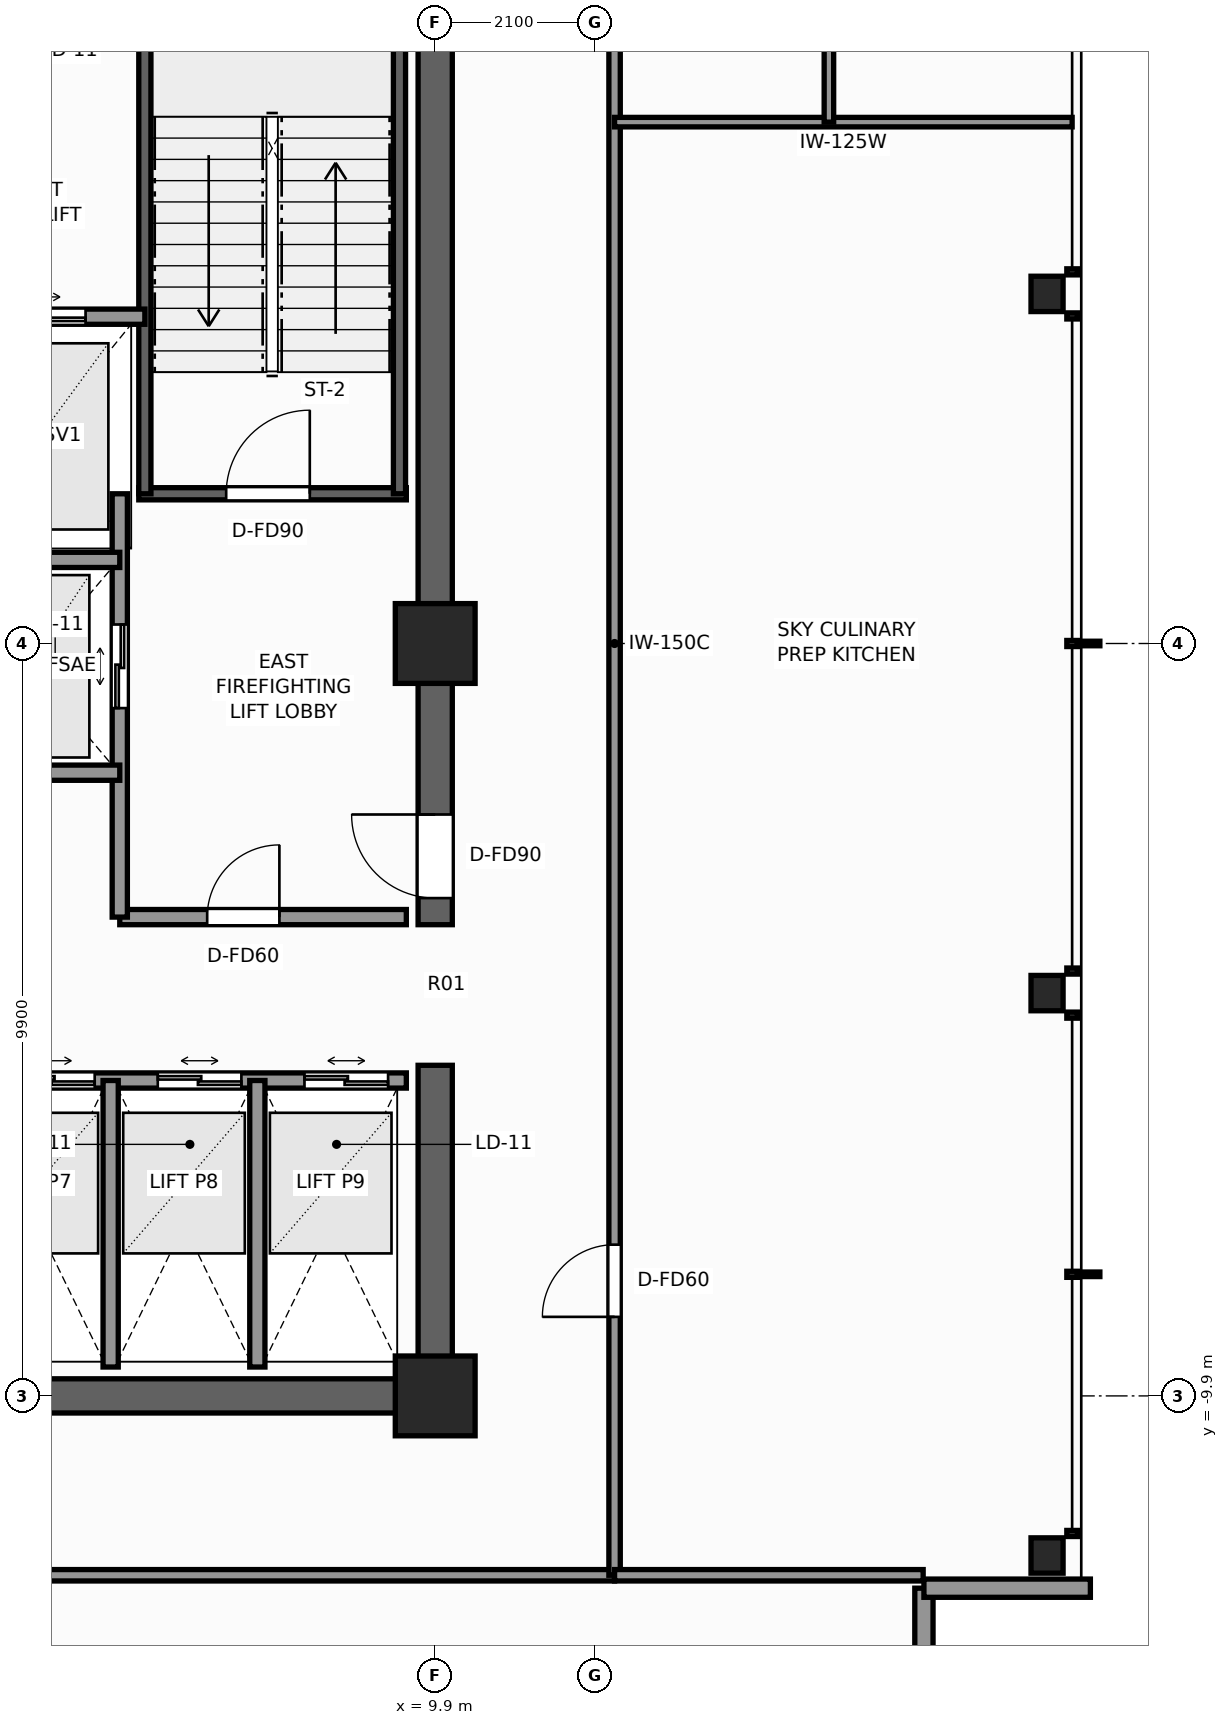
"""IFC4 building model, lengths in metres.
Left out: names, types, materials, properties, quantities, classifications, styles, units other than length and angle.
Written with IfcOpenShell. Run it as: python <this file> out.ifc"""

import sys

from ifc_helpers import new_model, si_unit, direction, frame, frame_2d, origin, origin_2d, place, context, subcontext, project, spatial, rectangle, i_section, extrude, element, fill, save


model = new_model("IFC4")
c1 = context("Model", 3, precision=1e-05, world=origin(), true_north=direction((0.0, 1.0)))
c2 = subcontext(c1, "Body", "Model", "MODEL_VIEW")
j1 = project(units=[si_unit("LENGTHUNIT", "METRE"), si_unit("PLANEANGLEUNIT", "RADIAN")], contexts=[c1])
p1 = place(None, origin())
s1 = spatial("IfcSite", under=j1, at=p1, CompositionType="ELEMENT")
p2 = place(p1, origin())
s2 = spatial("IfcBuilding", under=s1, at=p2, CompositionType="ELEMENT")
p3 = place(p2, frame((0.0, 0.0, 258.4)))
s3 = spatial("IfcBuildingStorey", under=s2, at=p3, CompositionType="ELEMENT", Elevation=258.4)
p4 = place(p3, frame((10.125, -9.9, 0.0), z_axis=(0.0, 0.0, 1.0), x_axis=(-1.0, 0.0, 0.0)))
e1 = element("IfcWall", 1, at=p4, inside=s3, PredefinedType="SHEAR", context=c2, shape_type="SweptSolid", body=[
    extrude(rectangle(XDim=11.985, YDim=0.45, at=frame_2d((5.993, 0.0))), origin(), (0.0, 0.0, 1.0), 4.4),
])
p5 = place(p3, frame((9.9, -9.675, 0.0), z_axis=(0.0, 0.0, 1.0), x_axis=(0.0, 1.0, 0.0)))
e2 = element("IfcWall", 2, at=p5, inside=s3, PredefinedType="SHEAR", context=c2, shape_type="SweptSolid", body=[
    extrude(rectangle(XDim=4.125, YDim=0.45, at=frame_2d((2.062, 0.0))), origin(), (0.0, 0.0, 1.0), 4.4),
])
p6 = place(p3, frame((9.9, -3.7, 0.0), z_axis=(0.0, 0.0, 1.0), x_axis=(0.0, 1.0, 0.0)))
e3 = element("IfcWall", 3, at=p6, inside=s3, PredefinedType="SHEAR", context=c2, shape_type="SweptSolid", body=[
    extrude(rectangle(XDim=13.375, YDim=0.45, at=frame_2d((6.688, 0.0))), origin(), (0.0, 0.0, 1.0), 4.4),
])
p7 = place(p6, frame((0.35, 0.0, 0.0)))
e4 = element("IfcOpeningElement", 4, at=p7, cuts=e3, PredefinedType="OPENING", context=c2, shape_type="SweptSolid", body=[
    extrude(rectangle(XDim=1.1, YDim=2.2, at=frame_2d((0.55, 1.1))), frame((0.0, 0.235, 0.0), z_axis=(0.0, -1.0, 0.0), x_axis=(1.0, 0.0, 0.0)), (0.0, 0.0, 1.0), 0.47),
])
for number, where, z_axis, x_axis in (
    (5, (9.9, -9.9, 0.0), (0.0, 0.0, 1.0), (1.0, 0.0, 0.0)),
    (6, (9.9, 0.0, 0.0), (0.0, 0.0, 1.0), (1.0, 0.0, 0.0)),
):
    element("IfcColumn", number, at=place(p3, frame(where, z_axis=z_axis, x_axis=x_axis)), inside=s3, PredefinedType="COLUMN", context=c2, shape_type="SweptSolid", body=[
        extrude(rectangle(XDim=1.05, YDim=1.05, at=origin_2d()), origin(), (0.0, 0.0, 1.0), 4.4),
    ])
for number, where, z_axis, x_axis in (
    (7, (17.95, -12.0, 0.0), (0.0, 0.0, 1.0), (1.0, 0.0, 0.0)),
    (8, (17.95, -4.6, 0.0), (0.0, 0.0, 1.0), (1.0, 0.0, 0.0)),
    (9, (17.95, 4.6, 0.0), (0.0, 0.0, 1.0), (1.0, 0.0, 0.0)),
):
    element("IfcColumn", number, at=place(p3, frame(where, z_axis=z_axis, x_axis=x_axis)), inside=s3, PredefinedType="COLUMN", context=c2, shape_type="SweptSolid", body=[
        extrude(i_section(OverallWidth=0.422, OverallDepth=0.465, WebThickness=0.045, FlangeThickness=0.073, FilletRadius=0.025, at=origin_2d()), origin(), (0.0, 0.0, 1.0), 4.4),
    ])
p8 = place(p3, frame((16.33, -12.43, 0.0), z_axis=(0.0, 0.0, 1.0), x_axis=(0.0, -1.0, 0.0)))
e10 = element("IfcWall", 10, at=p8, inside=s3, PredefinedType="STANDARD", context=c2, shape_type="SweptSolid", body=[
    extrude(rectangle(XDim=2.19, YDim=0.24, at=frame_2d((1.095, 0.0))), origin(), (0.0, 0.0, 1.0), 3.503),
])
p9 = place(p3, frame((18.52, -12.43, 0.0), z_axis=(0.0, 0.0, 1.0), x_axis=(-1.0, 0.0, 0.0)))
e11 = element("IfcWall", 11, at=p9, inside=s3, PredefinedType="STANDARD", context=c2, shape_type="SweptSolid", body=[
    extrude(rectangle(XDim=2.19, YDim=0.24, at=frame_2d((1.095, 0.0))), origin(), (0.0, 0.0, 1.0), 3.503),
])
p10 = place(p3, frame((6.0, 1.97, 0.0), z_axis=(0.0, 0.0, 1.0), x_axis=(1.0, 0.0, 0.0)))
e12 = element("IfcWall", 12, at=p10, inside=s3, PredefinedType="SHEAR", context=c2, shape_type="SweptSolid", body=[
    extrude(rectangle(XDim=3.52, YDim=0.16, at=frame_2d((1.76, 0.0))), origin(), (0.0, 0.0, 1.0), 4.4),
])
p11 = place(p10, frame((1.15, 0.0, 0.0)))
e13 = element("IfcOpeningElement", 13, at=p11, cuts=e12, PredefinedType="OPENING", context=c2, shape_type="SweptSolid", body=[
    extrude(rectangle(XDim=1.1, YDim=2.2, at=frame_2d((0.55, 1.1))), frame((0.0, 0.09, 0.0), z_axis=(0.0, -1.0, 0.0), x_axis=(1.0, 0.0, 0.0)), (0.0, 0.0, 1.0), 0.18),
])
for number, where, z_axis, x_axis in (
    (14, (6.08, 1.97, 0.0), (0.0, 0.0, 1.0), (0.0, 1.0, 0.0)),
    (15, (9.43, 1.97, 0.0), (0.0, 0.0, 1.0), (0.0, 1.0, 0.0)),
):
    element("IfcWall", number, at=place(p3, frame(where, z_axis=z_axis, x_axis=x_axis)), inside=s3, PredefinedType="SHEAR", context=c2, shape_type="SweptSolid", body=[
        extrude(rectangle(XDim=7.56, YDim=0.16, at=frame_2d((3.78, 0.0))), origin(), (0.0, 0.0, 1.0), 4.4),
    ])
p12 = place(p3, frame((5.75, -3.6, 0.0), z_axis=(0.0, 0.0, 1.0), x_axis=(1.0, 0.0, 0.0)))
e16 = element("IfcWall", 16, at=p12, inside=s3, PredefinedType="SOLIDWALL", context=c2, shape_type="SweptSolid", body=[
    extrude(rectangle(XDim=3.77, YDim=0.2, at=frame_2d((1.885, 0.0))), origin(), (0.0, 0.0, 1.0), 4.12),
])
p13 = place(p12, frame((1.15, 0.0, 0.0)))
e17 = element("IfcOpeningElement", 17, at=p13, cuts=e16, PredefinedType="OPENING", context=c2, shape_type="SweptSolid", body=[
    extrude(rectangle(XDim=0.95, YDim=2.06, at=frame_2d((0.475, 1.03))), frame((0.0, 0.11, 0.0), z_axis=(0.0, -1.0, 0.0), x_axis=(1.0, 0.0, 0.0)), (0.0, 0.0, 1.0), 0.22),
])
p14 = place(p3, frame((5.75, -3.6, 0.0), z_axis=(0.0, 0.0, 1.0), x_axis=(0.0, 1.0, 0.0)))
e18 = element("IfcWall", 18, at=p14, inside=s3, PredefinedType="SOLIDWALL", context=c2, shape_type="SweptSolid", body=[
    extrude(rectangle(XDim=5.57, YDim=0.2, at=frame_2d((2.785, 0.0))), origin(), (0.0, 0.0, 1.0), 4.12),
])
p15 = place(p14, frame((2.75, 0.0, 0.0)))
e19 = element("IfcOpeningElement", 19, at=p15, cuts=e18, PredefinedType="OPENING", context=c2, shape_type="SweptSolid", body=[
    extrude(rectangle(XDim=1.1, YDim=2.2, at=frame_2d((0.55, 1.1))), frame((0.0, 0.11, 0.0), z_axis=(0.0, -1.0, 0.0), x_axis=(1.0, 0.0, 0.0)), (0.0, 0.0, 1.0), 0.22),
])
for number, where, z_axis, x_axis in (
    (20, (3.35, -1.7, 0.0), (0.0, 0.0, 1.0), (1.0, 0.0, 0.0)),
    (21, (3.35, 1.1, 0.0), (0.0, 0.0, 1.0), (1.0, 0.0, 0.0)),
):
    element("IfcWall", number, at=place(p3, frame(where, z_axis=z_axis, x_axis=x_axis)), inside=s3, PredefinedType="SOLIDWALL", context=c2, shape_type="SweptSolid", body=[
        extrude(rectangle(XDim=2.4, YDim=0.2, at=frame_2d((1.2, 0.0))), origin(), (0.0, 0.0, 1.0), 4.12),
    ])
p16 = place(p3, frame((3.35, 4.3, 0.0), z_axis=(0.0, 0.0, 1.0), x_axis=(1.0, 0.0, 0.0)))
e22 = element("IfcWall", 22, at=p16, inside=s3, PredefinedType="SOLIDWALL", context=c2, shape_type="SweptSolid", body=[
    extrude(rectangle(XDim=2.73, YDim=0.2, at=frame_2d((1.365, 0.0))), origin(), (0.0, 0.0, 1.0), 4.12),
])
p17 = place(p16, frame((0.75, 0.0, 0.0)))
e23 = element("IfcOpeningElement", 23, at=p17, cuts=e22, PredefinedType="OPENING", context=c2, shape_type="SweptSolid", body=[
    extrude(rectangle(XDim=1.2, YDim=2.25, at=frame_2d((0.6, 1.125))), frame((0.0, 0.11, 0.0), z_axis=(0.0, -1.0, 0.0), x_axis=(1.0, 0.0, 0.0)), (0.0, 0.0, 1.0), 0.22),
])
p18 = place(p3, frame((3.86, -5.75, 0.0), z_axis=(0.0, 0.0, 1.0), x_axis=(1.0, 0.0, 0.0)))
e24 = element("IfcWall", 24, at=p18, inside=s3, PredefinedType="SOLIDWALL", context=c2, shape_type="SweptSolid", body=[
    extrude(rectangle(XDim=5.66, YDim=0.2, at=frame_2d((2.83, 0.0))), origin(), (0.0, 0.0, 1.0), 4.12),
])
p19 = place(p18, frame((0.46, 0.0, 0.0)))
e25 = element("IfcOpeningElement", 25, at=p19, cuts=e24, PredefinedType="OPENING", context=c2, shape_type="SweptSolid", body=[
    extrude(rectangle(XDim=1.1, YDim=2.2, at=frame_2d((0.55, 1.1))), frame((0.0, 0.11, 0.0), z_axis=(0.0, -1.0, 0.0), x_axis=(1.0, 0.0, 0.0)), (0.0, 0.0, 1.0), 0.22),
])
p20 = place(p18, frame((2.39, 0.0, 0.0)))
e26 = element("IfcOpeningElement", 26, at=p20, cuts=e24, PredefinedType="OPENING", context=c2, shape_type="SweptSolid", body=[
    extrude(rectangle(XDim=1.1, YDim=2.2, at=frame_2d((0.55, 1.1))), frame((0.0, 0.11, 0.0), z_axis=(0.0, -1.0, 0.0), x_axis=(1.0, 0.0, 0.0)), (0.0, 0.0, 1.0), 0.22),
])
p21 = place(p18, frame((4.32, 0.0, 0.0)))
e27 = element("IfcOpeningElement", 27, at=p21, cuts=e24, PredefinedType="OPENING", context=c2, shape_type="SweptSolid", body=[
    extrude(rectangle(XDim=1.1, YDim=2.2, at=frame_2d((0.55, 1.1))), frame((0.0, 0.11, 0.0), z_axis=(0.0, -1.0, 0.0), x_axis=(1.0, 0.0, 0.0)), (0.0, 0.0, 1.0), 0.22),
])
for number, where, z_axis, x_axis in (
    (28, (5.63, -9.52, 0.0), (0.0, 0.0, 1.0), (0.0, 1.0, 0.0)),
    (29, (7.56, -9.52, 0.0), (0.0, 0.0, 1.0), (0.0, 1.0, 0.0)),
):
    element("IfcWall", number, at=place(p3, frame(where, z_axis=z_axis, x_axis=x_axis)), inside=s3, PredefinedType="SOLIDWALL", context=c2, shape_type="SweptSolid", body=[
        extrude(rectangle(XDim=3.77, YDim=0.2, at=frame_2d((1.885, 0.0))), origin(), (0.0, 0.0, 1.0), 4.12),
    ])
p22 = place(p3, frame((-12.26, -12.26, 0.0), z_axis=(0.0, 0.0, 1.0), x_axis=(1.0, 0.0, 0.0)))
e30 = element("IfcWall", 30, at=p22, inside=s3, PredefinedType="PARTITIONING", context=c2, shape_type="SweptSolid", body=[
    extrude(rectangle(XDim=24.52, YDim=0.15, at=frame_2d((12.26, 0.0))), origin(), (0.0, 0.0, 1.0), 3.409),
])
p23 = place(p22, frame((3.6, 0.0, 0.0)))
e31 = element("IfcOpeningElement", 31, at=p23, cuts=e30, PredefinedType="OPENING", context=c2, shape_type="SweptSolid", body=[
    extrude(rectangle(XDim=1.6, YDim=2.3, at=frame_2d((0.8, 1.15))), frame((0.0, 0.085, 0.0), z_axis=(0.0, -1.0, 0.0), x_axis=(1.0, 0.0, 0.0)), (0.0, 0.0, 1.0), 0.17),
])
p24 = place(p22, frame((11.26, 0.0, 0.0)))
e32 = element("IfcOpeningElement", 32, at=p24, cuts=e30, PredefinedType="OPENING", context=c2, shape_type="SweptSolid", body=[
    extrude(rectangle(XDim=1.2, YDim=2.2, at=frame_2d((0.6, 1.1))), frame((0.0, 0.085, 0.0), z_axis=(0.0, -1.0, 0.0), x_axis=(1.0, 0.0, 0.0)), (0.0, 0.0, 1.0), 0.17),
])
p25 = place(p3, frame((12.26, -12.26, 0.0), z_axis=(0.0, 0.0, 1.0), x_axis=(0.0, 1.0, 0.0)))
e33 = element("IfcWall", 33, at=p25, inside=s3, PredefinedType="PARTITIONING", context=c2, shape_type="SweptSolid", body=[
    extrude(rectangle(XDim=24.52, YDim=0.15, at=frame_2d((12.26, 0.0))), origin(), (0.0, 0.0, 1.0), 3.409),
])
p26 = place(p25, frame((3.4, 0.0, 0.0)))
e34 = element("IfcOpeningElement", 34, at=p26, cuts=e33, PredefinedType="OPENING", context=c2, shape_type="SweptSolid", body=[
    extrude(rectangle(XDim=0.95, YDim=2.06, at=frame_2d((0.475, 1.03))), frame((0.0, 0.085, 0.0), z_axis=(0.0, -1.0, 0.0), x_axis=(1.0, 0.0, 0.0)), (0.0, 0.0, 1.0), 0.17),
])
p27 = place(p25, frame((20.22, 0.0, 0.0)))
e35 = element("IfcOpeningElement", 35, at=p27, cuts=e33, PredefinedType="OPENING", context=c2, shape_type="SweptSolid", body=[
    extrude(rectangle(XDim=0.95, YDim=2.06, at=frame_2d((0.475, 1.03))), frame((0.0, 0.085, 0.0), z_axis=(0.0, -1.0, 0.0), x_axis=(1.0, 0.0, 0.0)), (0.0, 0.0, 1.0), 0.17),
])
p28 = place(p3, frame((12.26, -12.26, 0.0), z_axis=(0.0, 0.0, 1.0), x_axis=(1.0, 0.0, 0.0)))
e36 = element("IfcWall", 36, at=p28, inside=s3, PredefinedType="PARTITIONING", context=c2, shape_type="SweptSolid", body=[
    extrude(rectangle(XDim=4.06, YDim=0.15, at=frame_2d((2.03, 0.0))), origin(), (0.0, 0.0, 1.0), 4.12),
])
p29 = place(p3, frame((12.26, 6.86, 0.0), z_axis=(0.0, 0.0, 1.0), x_axis=(1.0, 0.0, 0.0)))
e37 = element("IfcWall", 37, at=p29, inside=s3, PredefinedType="PARTITIONING", context=c2, shape_type="SweptSolid", body=[
    extrude(rectangle(XDim=6.02, YDim=0.125, at=frame_2d((3.01, 0.0))), origin(), (0.0, 0.0, 1.0), 3.493),
])
p30 = place(p3, frame((15.08, 6.86, 0.0), z_axis=(0.0, 0.0, 1.0), x_axis=(0.0, 1.0, 0.0)))
e38 = element("IfcWall", 38, at=p30, inside=s3, PredefinedType="PARTITIONING", context=c2, shape_type="SweptSolid", body=[
    extrude(rectangle(XDim=5.4, YDim=0.125, at=frame_2d((2.7, 0.0))), origin(), (0.0, 0.0, 1.0), 3.409),
])
p31 = place(p30, frame((1.2, 0.0, 0.0)))
e39 = element("IfcOpeningElement", 39, at=p31, cuts=e38, PredefinedType="OPENING", context=c2, shape_type="SweptSolid", body=[
    extrude(rectangle(XDim=0.9, YDim=2.06, at=frame_2d((0.45, 1.03))), frame((0.0, 0.073, 0.0), z_axis=(0.0, -1.0, 0.0), x_axis=(1.0, 0.0, 0.0)), (0.0, 0.0, 1.0), 0.145),
])
p32 = place(p11, origin())
e40 = element("IfcDoor", 40, at=p32, inside=s3, OperationType="SINGLE_SWING_RIGHT", PredefinedType="DOOR", context=c2, shape_type="SweptSolid", body=[
    extrude(rectangle(XDim=1.1, YDim=2.2, at=frame_2d((0.55, 1.1))), frame((0.0, 0.025, 0.0), z_axis=(0.0, -1.0, 0.0), x_axis=(1.0, 0.0, 0.0)), (0.0, 0.0, 1.0), 0.05),
])
fill(e13, e40)
p33 = place(p7, origin())
e41 = element("IfcDoor", 41, at=p33, inside=s3, OperationType="SINGLE_SWING_RIGHT", PredefinedType="DOOR", context=c2, shape_type="SweptSolid", body=[
    extrude(rectangle(XDim=1.1, YDim=2.2, at=frame_2d((0.55, 1.1))), frame((0.0, 0.025, 0.0), z_axis=(0.0, -1.0, 0.0), x_axis=(1.0, 0.0, 0.0)), (0.0, 0.0, 1.0), 0.05),
])
fill(e4, e41)
p34 = place(p15, origin())
e42 = element("IfcDoor", 42, at=p34, inside=s3, OperationType="DOUBLE_DOOR_SLIDING", PredefinedType="DOOR", context=c2, shape_type="SweptSolid", body=[
    extrude(rectangle(XDim=1.1, YDim=2.2, at=frame_2d((0.55, 1.1))), frame((0.0, 0.025, 0.0), z_axis=(0.0, -1.0, 0.0), x_axis=(1.0, 0.0, 0.0)), (0.0, 0.0, 1.0), 0.05),
])
fill(e19, e42)
p35 = place(p17, origin())
e43 = element("IfcDoor", 43, at=p35, inside=s3, OperationType="DOUBLE_DOOR_SLIDING", PredefinedType="DOOR", context=c2, shape_type="SweptSolid", body=[
    extrude(rectangle(XDim=1.2, YDim=2.25, at=frame_2d((0.6, 1.125))), frame((0.0, 0.025, 0.0), z_axis=(0.0, -1.0, 0.0), x_axis=(1.0, 0.0, 0.0)), (0.0, 0.0, 1.0), 0.05),
])
fill(e23, e43)
p36 = place(p19, origin())
e44 = element("IfcDoor", 44, at=p36, inside=s3, OperationType="DOUBLE_DOOR_SLIDING", PredefinedType="DOOR", context=c2, shape_type="SweptSolid", body=[
    extrude(rectangle(XDim=1.1, YDim=2.2, at=frame_2d((0.55, 1.1))), frame((0.0, 0.025, 0.0), z_axis=(0.0, -1.0, 0.0), x_axis=(1.0, 0.0, 0.0)), (0.0, 0.0, 1.0), 0.05),
])
fill(e25, e44)
p37 = place(p20, origin())
e45 = element("IfcDoor", 45, at=p37, inside=s3, OperationType="DOUBLE_DOOR_SLIDING", PredefinedType="DOOR", context=c2, shape_type="SweptSolid", body=[
    extrude(rectangle(XDim=1.1, YDim=2.2, at=frame_2d((0.55, 1.1))), frame((0.0, 0.025, 0.0), z_axis=(0.0, -1.0, 0.0), x_axis=(1.0, 0.0, 0.0)), (0.0, 0.0, 1.0), 0.05),
])
fill(e26, e45)
p38 = place(p21, origin())
e46 = element("IfcDoor", 46, at=p38, inside=s3, OperationType="DOUBLE_DOOR_SLIDING", PredefinedType="DOOR", context=c2, shape_type="SweptSolid", body=[
    extrude(rectangle(XDim=1.1, YDim=2.2, at=frame_2d((0.55, 1.1))), frame((0.0, 0.025, 0.0), z_axis=(0.0, -1.0, 0.0), x_axis=(1.0, 0.0, 0.0)), (0.0, 0.0, 1.0), 0.05),
])
fill(e27, e46)
p39 = place(p13, origin())
e47 = element("IfcDoor", 47, at=p39, inside=s3, OperationType="SINGLE_SWING_RIGHT", PredefinedType="DOOR", context=c2, shape_type="SweptSolid", body=[
    extrude(rectangle(XDim=0.95, YDim=2.06, at=frame_2d((0.475, 1.03))), frame((0.0, 0.025, 0.0), z_axis=(0.0, -1.0, 0.0), x_axis=(1.0, 0.0, 0.0)), (0.0, 0.0, 1.0), 0.05),
])
fill(e17, e47)
p40 = place(p26, origin())
e48 = element("IfcDoor", 48, at=p40, inside=s3, OperationType="SINGLE_SWING_LEFT", PredefinedType="DOOR", context=c2, shape_type="SweptSolid", body=[
    extrude(rectangle(XDim=0.95, YDim=2.06, at=frame_2d((0.475, 1.03))), frame((0.0, 0.025, 0.0), z_axis=(0.0, -1.0, 0.0), x_axis=(1.0, 0.0, 0.0)), (0.0, 0.0, 1.0), 0.05),
])
fill(e34, e48)
save(model, sys.argv[1])
